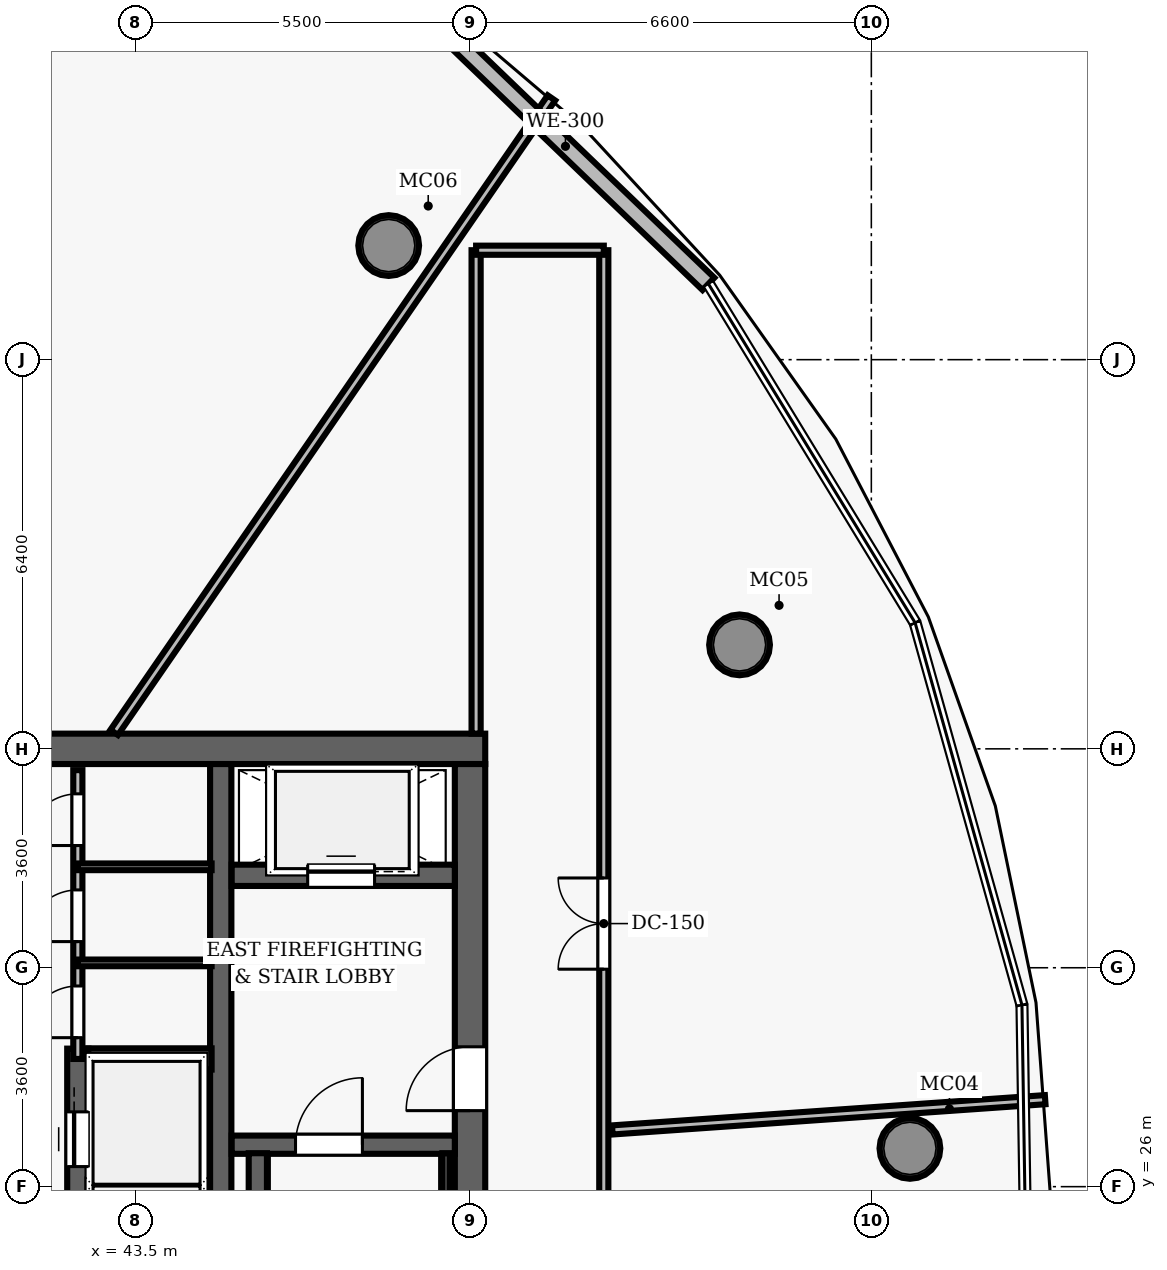
"""IFC4 building model, lengths in metres.
Left out: names, types, materials, properties, quantities, classifications, styles, units other than length and angle.
Written with IfcOpenShell. Run it as: python <this file> out.ifc"""

import sys

from ifc_helpers import new_model, si_unit, direction, frame, frame_2d, origin, origin_2d, place, context, subcontext, project, spatial, rectangle, hollow_circle, extrude, element, fill, save


model = new_model("IFC4")
c1 = context("Model", 3, precision=1e-05, world=origin(), true_north=direction((0.0, 1.0)))
c2 = subcontext(c1, "Body", "Model", "MODEL_VIEW")
j1 = project(units=[si_unit("LENGTHUNIT", "METRE"), si_unit("PLANEANGLEUNIT", "RADIAN")], contexts=[c1])
p1 = place(None, origin())
s1 = spatial("IfcSite", under=j1, at=p1, CompositionType="ELEMENT")
p2 = place(p1, origin())
s2 = spatial("IfcBuilding", under=s1, at=p2, CompositionType="ELEMENT")
p3 = place(p2, frame((0.0, 0.0, 299.8)))
s3 = spatial("IfcBuildingStorey", under=s2, at=p3, CompositionType="ELEMENT", Elevation=299.8)
p4 = place(p3, frame((26.75, 33.2, 0.0), z_axis=(0.0, 0.0, 1.0), x_axis=(1.0, 0.0, 0.0)))
e1 = element("IfcWall", 1, at=p4, inside=s3, PredefinedType="SHEAR", context=c2, shape_type="SweptSolid", body=[
    extrude(rectangle(XDim=22.5, YDim=0.5, at=frame_2d((11.25, 0.0))), origin(), (0.0, 0.0, 1.0), 3.85),
])
p5 = place(p3, frame((49.0, 19.05, 0.0), z_axis=(0.0, 0.0, 1.0), x_axis=(0.0, 1.0, 0.0)))
e2 = element("IfcWall", 2, at=p5, inside=s3, PredefinedType="SHEAR", context=c2, shape_type="SweptSolid", body=[
    extrude(rectangle(XDim=13.9, YDim=0.5, at=frame_2d((6.95, 0.0))), origin(), (0.0, 0.0, 1.0), 3.85),
])
p6 = place(p5, frame((8.2, 0.0, 0.0)))
e3 = element("IfcOpeningElement", 3, at=p6, cuts=e2, PredefinedType="OPENING", context=c2, shape_type="SweptSolid", body=[
    extrude(rectangle(XDim=1.05, YDim=2.15, at=frame_2d((0.525, 1.075))), frame((0.0, 0.26, 0.0), z_axis=(0.0, -1.0, 0.0), x_axis=(1.0, 0.0, 0.0)), (0.0, 0.0, 1.0), 0.52),
])
p7 = place(p3, frame((44.9, 19.05, 0.0), z_axis=(0.0, 0.0, 1.0), x_axis=(0.0, 1.0, 0.0)))
e4 = element("IfcWall", 4, at=p7, inside=s3, PredefinedType="SHEAR", context=c2, shape_type="SweptSolid", body=[
    extrude(rectangle(XDim=13.9, YDim=0.35, at=frame_2d((6.95, 0.0))), origin(), (0.0, 0.0, 1.0), 3.85),
])
for number, where, z_axis, x_axis in (
    (5, (56.235, 26.629, 0.0), (0.0, 0.0, 1.0), (1.0, 0.0, 0.0)),
    (6, (53.433, 34.91, 0.0), (0.0, 0.0, 1.0), (1.0, 0.0, 0.0)),
    (7, (47.662, 41.477, 0.0), (0.0, 0.0, 1.0), (1.0, 0.0, 0.0)),
):
    element("IfcColumn", number, at=place(p3, frame(where, z_axis=z_axis, x_axis=x_axis)), inside=s3, PredefinedType="COLUMN", context=c2, shape_type="SweptSolid", body=[
        extrude(hollow_circle(Radius=0.5, WallThickness=0.045, at=origin_2d()), origin(), (0.0, 0.0, 1.0), 3.85),
    ])
p8 = place(p3, frame((45.08, 26.69, 0.0), z_axis=(0.0, 0.0, 1.0), x_axis=(1.0, 0.0, 0.0)))
e8 = element("IfcWall", 8, at=p8, inside=s3, PredefinedType="SHEAR", context=c2, shape_type="SweptSolid", body=[
    extrude(rectangle(XDim=3.67, YDim=0.3, at=frame_2d((1.835, 0.0))), origin(), (0.0, 0.0, 1.0), 3.85),
])
p9 = place(p8, frame((1.05, 0.0, 0.0)))
e9 = element("IfcOpeningElement", 9, at=p9, cuts=e8, PredefinedType="OPENING", context=c2, shape_type="SweptSolid", body=[
    extrude(rectangle(XDim=1.1, YDim=2.15, at=frame_2d((0.55, 1.075))), frame((0.0, 0.16, 0.0), z_axis=(0.0, -1.0, 0.0), x_axis=(1.0, 0.0, 0.0)), (0.0, 0.0, 1.0), 0.32),
])
p10 = place(p3, frame((45.51, 19.05, 0.0), z_axis=(0.0, 0.0, 1.0), x_axis=(0.0, 1.0, 0.0)))
e10 = element("IfcWall", 10, at=p10, inside=s3, PredefinedType="SHEAR", context=c2, shape_type="SweptSolid", body=[
    extrude(rectangle(XDim=7.5, YDim=0.3, at=frame_2d((3.75, 0.0))), origin(), (0.0, 0.0, 1.0), 3.85),
])
p11 = place(p3, frame((48.605, 19.1, 0.0), z_axis=(0.0, 0.0, 1.0), x_axis=(0.0, 1.0, 0.0)))
e11 = element("IfcWall", 11, at=p11, inside=s3, PredefinedType="SHEAR", context=c2, shape_type="SweptSolid", body=[
    extrude(rectangle(XDim=7.45, YDim=0.12, at=frame_2d((3.725, 0.0))), origin(), (0.0, 0.0, 1.0), 3.85),
])
p12 = place(p3, frame((45.08, 31.12, 0.0), z_axis=(0.0, 0.0, 1.0), x_axis=(1.0, 0.0, 0.0)))
e12 = element("IfcWall", 12, at=p12, inside=s3, PredefinedType="SHEAR", context=c2, shape_type="SweptSolid", body=[
    extrude(rectangle(XDim=3.67, YDim=0.35, at=frame_2d((1.835, 0.0))), origin(), (0.0, 0.0, 1.0), 3.04),
])
p13 = place(p12, frame((1.25, 0.0, 0.0)))
e13 = element("IfcOpeningElement", 13, at=p13, cuts=e12, PredefinedType="OPENING", context=c2, shape_type="SweptSolid", body=[
    extrude(rectangle(XDim=1.1, YDim=2.15, at=frame_2d((0.55, 1.075))), frame((0.0, 0.185, 0.0), z_axis=(0.0, -1.0, 0.0), x_axis=(1.0, 0.0, 0.0)), (0.0, 0.0, 1.0), 0.37),
])
p14 = place(p3, frame((42.55, 21.73, 0.0), z_axis=(0.0, 0.0, 1.0), x_axis=(0.0, 1.0, 0.0)))
e14 = element("IfcWall", 14, at=p14, inside=s3, PredefinedType="SHEAR", context=c2, shape_type="SweptSolid", body=[
    extrude(rectangle(XDim=6.54, YDim=0.35, at=frame_2d((3.27, 0.0))), origin(), (0.0, 0.0, 1.0), 3.04),
])
p15 = place(p14, frame((0.5, 0.0, 0.0)))
e15 = element("IfcOpeningElement", 15, at=p15, cuts=e14, PredefinedType="OPENING", context=c2, shape_type="SweptSolid", body=[
    extrude(rectangle(XDim=0.9, YDim=2.15, at=frame_2d((0.45, 1.075))), frame((0.0, 0.185, 0.0), z_axis=(0.0, -1.0, 0.0), x_axis=(1.0, 0.0, 0.0)), (0.0, 0.0, 1.0), 0.37),
])
p16 = place(p14, frame((2.55, 0.0, 0.0)))
e16 = element("IfcOpeningElement", 16, at=p16, cuts=e14, PredefinedType="OPENING", context=c2, shape_type="SweptSolid", body=[
    extrude(rectangle(XDim=0.9, YDim=2.15, at=frame_2d((0.45, 1.075))), frame((0.0, 0.185, 0.0), z_axis=(0.0, -1.0, 0.0), x_axis=(1.0, 0.0, 0.0)), (0.0, 0.0, 1.0), 0.37),
])
p17 = place(p14, frame((4.6, 0.0, 0.0)))
e17 = element("IfcOpeningElement", 17, at=p17, cuts=e14, PredefinedType="OPENING", context=c2, shape_type="SweptSolid", body=[
    extrude(rectangle(XDim=0.9, YDim=2.15, at=frame_2d((0.45, 1.075))), frame((0.0, 0.185, 0.0), z_axis=(0.0, -1.0, 0.0), x_axis=(1.0, 0.0, 0.0)), (0.0, 0.0, 1.0), 0.37),
])
p18 = place(p3, frame((42.72, 28.1, 0.0), z_axis=(0.0, 0.0, 1.0), x_axis=(1.0, 0.0, 0.0)))
e18 = element("IfcWall", 18, at=p18, inside=s3, PredefinedType="SHEAR", context=c2, shape_type="SweptSolid", body=[
    extrude(rectangle(XDim=2.03, YDim=0.35, at=frame_2d((1.015, 0.0))), origin(), (0.0, 0.0, 1.0), 3.04),
])
p19 = place(p3, frame((42.55, 28.1, 0.0), z_axis=(0.0, 0.0, 1.0), x_axis=(0.0, 1.0, 0.0)))
e19 = element("IfcWall", 19, at=p19, inside=s3, PredefinedType="PARTITIONING", context=c2, shape_type="SweptSolid", body=[
    extrude(rectangle(XDim=4.75, YDim=0.15, at=frame_2d((2.375, 0.0))), origin(), (0.0, 0.0, 1.0), 3.04),
])
p20 = place(p19, frame((0.35, 0.0, 0.0)))
e20 = element("IfcOpeningElement", 20, at=p20, cuts=e19, PredefinedType="OPENING", context=c2, shape_type="SweptSolid", body=[
    extrude(rectangle(XDim=0.85, YDim=2.1, at=frame_2d((0.425, 1.05))), frame((0.0, 0.085, 0.0), z_axis=(0.0, -1.0, 0.0), x_axis=(1.0, 0.0, 0.0)), (0.0, 0.0, 1.0), 0.17),
])
p21 = place(p19, frame((1.93, 0.0, 0.0)))
e21 = element("IfcOpeningElement", 21, at=p21, cuts=e19, PredefinedType="OPENING", context=c2, shape_type="SweptSolid", body=[
    extrude(rectangle(XDim=0.85, YDim=2.1, at=frame_2d((0.425, 1.05))), frame((0.0, 0.085, 0.0), z_axis=(0.0, -1.0, 0.0), x_axis=(1.0, 0.0, 0.0)), (0.0, 0.0, 1.0), 0.17),
])
p22 = place(p19, frame((3.51, 0.0, 0.0)))
e22 = element("IfcOpeningElement", 22, at=p22, cuts=e19, PredefinedType="OPENING", context=c2, shape_type="SweptSolid", body=[
    extrude(rectangle(XDim=0.85, YDim=2.1, at=frame_2d((0.425, 1.05))), frame((0.0, 0.085, 0.0), z_axis=(0.0, -1.0, 0.0), x_axis=(1.0, 0.0, 0.0)), (0.0, 0.0, 1.0), 0.17),
])
for number, where, z_axis, x_axis in (
    (23, (42.55, 29.68, 0.0), (0.0, 0.0, 1.0), (1.0, 0.0, 0.0)),
    (24, (42.55, 31.26, 0.0), (0.0, 0.0, 1.0), (1.0, 0.0, 0.0)),
):
    element("IfcWall", number, at=place(p3, frame(where, z_axis=z_axis, x_axis=x_axis)), inside=s3, PredefinedType="PARTITIONING", context=c2, shape_type="SweptSolid", body=[
        extrude(rectangle(XDim=2.2, YDim=0.11, at=frame_2d((1.1, 0.0))), origin(), (0.0, 0.0, 1.0), 3.04),
    ])
p23 = place(p3, frame((51.2, 10.6, 0.0), z_axis=(0.0, 0.0, 1.0), x_axis=(0.0, 1.0, 0.0)))
e25 = element("IfcWall", 25, at=p23, inside=s3, PredefinedType="PARTITIONING", context=c2, shape_type="SweptSolid", body=[
    extrude(rectangle(XDim=30.8, YDim=0.15, at=frame_2d((15.4, 0.0))), origin(), (0.0, 0.0, 1.0), 3.04),
])
p24 = place(p23, frame((18.976, 0.0, 0.0)))
e26 = element("IfcOpeningElement", 26, at=p24, cuts=e25, PredefinedType="OPENING", context=c2, shape_type="SweptSolid", body=[
    extrude(rectangle(XDim=1.5, YDim=2.2, at=frame_2d((0.75, 1.1))), frame((0.0, 0.085, 0.0), z_axis=(0.0, -1.0, 0.0), x_axis=(1.0, 0.0, 0.0)), (0.0, 0.0, 1.0), 0.17),
])
p25 = place(p23, frame((12.135, 0.0, 0.0)))
e27 = element("IfcOpeningElement", 27, at=p25, cuts=e25, PredefinedType="OPENING", context=c2, shape_type="SweptSolid", body=[
    extrude(rectangle(XDim=0.95, YDim=2.15, at=frame_2d((0.475, 1.075))), frame((0.0, 0.085, 0.0), z_axis=(0.0, -1.0, 0.0), x_axis=(1.0, 0.0, 0.0)), (0.0, 0.0, 1.0), 0.17),
])
p26 = place(p3, frame((49.1, 33.45, 0.0), z_axis=(0.0, 0.0, 1.0), x_axis=(0.0, 1.0, 0.0)))
e28 = element("IfcWall", 28, at=p26, inside=s3, PredefinedType="PARTITIONING", context=c2, shape_type="SweptSolid", body=[
    extrude(rectangle(XDim=7.95, YDim=0.15, at=frame_2d((3.975, 0.0))), origin(), (0.0, 0.0, 1.0), 3.04),
])
p27 = place(p3, frame((49.1, 41.4, 0.0), z_axis=(0.0, 0.0, 1.0), x_axis=(1.0, 0.0, 0.0)))
e29 = element("IfcWall", 29, at=p27, inside=s3, PredefinedType="PARTITIONING", context=c2, shape_type="SweptSolid", body=[
    extrude(rectangle(XDim=2.1, YDim=0.15, at=frame_2d((1.05, 0.0))), origin(), (0.0, 0.0, 1.0), 3.04),
])
p28 = place(p3, frame((51.34, 26.933, 0.0), z_axis=(0.0, 0.0, 1.0), x_axis=(0.997564040522, 0.069756613005, 0.0)))
e30 = element("IfcWall", 30, at=p28, inside=s3, PredefinedType="PARTITIONING", context=c2, shape_type="SweptSolid", body=[
    extrude(rectangle(XDim=7.136, YDim=0.15, at=frame_2d((3.568, 0.0))), origin(), (0.0, 0.0, 1.0), 3.04),
])
p29 = place(p3, frame((43.148, 33.47, 0.0), z_axis=(0.0, 0.0, 1.0), x_axis=(0.56742949058, 0.82342198976, 0.0)))
e31 = element("IfcWall", 31, at=p29, inside=s3, PredefinedType="PARTITIONING", context=c2, shape_type="SweptSolid", body=[
    extrude(rectangle(XDim=12.673, YDim=0.15, at=frame_2d((6.336, 0.0))), origin(), (0.0, 0.0, 1.0), 3.04),
])
p30 = place(p3, frame((48.218, 45.371, 0.0), z_axis=(0.0, 0.0, 1.0), x_axis=(0.720629593397, -0.693320264467, 0.0)))
e32 = element("IfcWall", 32, at=p30, inside=s3, PredefinedType="SOLIDWALL", context=c2, shape_type="SweptSolid", body=[
    extrude(rectangle(XDim=6.526, YDim=0.28, at=frame_2d((3.263, 0.0))), origin(), (0.0, 0.0, 1.0), 3.625),
])
p31 = place(p9, origin())
e33 = element("IfcDoor", 33, at=p31, inside=s3, OperationType="SINGLE_SWING_RIGHT", PredefinedType="DOOR", context=c2, shape_type="SweptSolid", body=[
    extrude(rectangle(XDim=1.1, YDim=2.15, at=frame_2d((0.55, 1.075))), frame((0.0, 0.025, 0.0), z_axis=(0.0, -1.0, 0.0), x_axis=(1.0, 0.0, 0.0)), (0.0, 0.0, 1.0), 0.05),
])
fill(e9, e33)
p32 = place(p6, origin())
e34 = element("IfcDoor", 34, at=p32, inside=s3, OperationType="SINGLE_SWING_LEFT", PredefinedType="DOOR", context=c2, shape_type="SweptSolid", body=[
    extrude(rectangle(XDim=1.05, YDim=2.15, at=frame_2d((0.525, 1.075))), frame((0.0, 0.025, 0.0), z_axis=(0.0, -1.0, 0.0), x_axis=(1.0, 0.0, 0.0)), (0.0, 0.0, 1.0), 0.05),
])
fill(e3, e34)
p33 = place(p20, origin())
e35 = element("IfcDoor", 35, at=p33, inside=s3, OperationType="SINGLE_SWING_LEFT", PredefinedType="DOOR", context=c2, shape_type="SweptSolid", body=[
    extrude(rectangle(XDim=0.85, YDim=2.1, at=frame_2d((0.425, 1.05))), frame((0.0, 0.025, 0.0), z_axis=(0.0, -1.0, 0.0), x_axis=(1.0, 0.0, 0.0)), (0.0, 0.0, 1.0), 0.05),
])
fill(e20, e35)
p34 = place(p21, origin())
e36 = element("IfcDoor", 36, at=p34, inside=s3, OperationType="SINGLE_SWING_LEFT", PredefinedType="DOOR", context=c2, shape_type="SweptSolid", body=[
    extrude(rectangle(XDim=0.85, YDim=2.1, at=frame_2d((0.425, 1.05))), frame((0.0, 0.025, 0.0), z_axis=(0.0, -1.0, 0.0), x_axis=(1.0, 0.0, 0.0)), (0.0, 0.0, 1.0), 0.05),
])
fill(e21, e36)
p35 = place(p22, origin())
e37 = element("IfcDoor", 37, at=p35, inside=s3, OperationType="SINGLE_SWING_LEFT", PredefinedType="DOOR", context=c2, shape_type="SweptSolid", body=[
    extrude(rectangle(XDim=0.85, YDim=2.1, at=frame_2d((0.425, 1.05))), frame((0.0, 0.025, 0.0), z_axis=(0.0, -1.0, 0.0), x_axis=(1.0, 0.0, 0.0)), (0.0, 0.0, 1.0), 0.05),
])
fill(e22, e37)
p36 = place(p24, origin())
e38 = element("IfcDoor", 38, at=p36, inside=s3, OperationType="DOUBLE_DOOR_SINGLE_SWING", PredefinedType="DOOR", context=c2, shape_type="SweptSolid", body=[
    extrude(rectangle(XDim=1.5, YDim=2.2, at=frame_2d((0.75, 1.1))), frame((0.0, 0.025, 0.0), z_axis=(0.0, -1.0, 0.0), x_axis=(1.0, 0.0, 0.0)), (0.0, 0.0, 1.0), 0.05),
])
fill(e26, e38)
p37 = place(p17, origin())
e39 = element("IfcDoor", 39, at=p37, inside=s3, OperationType="SLIDING_TO_LEFT", PredefinedType="DOOR", context=c2, shape_type="SweptSolid", body=[
    extrude(rectangle(XDim=0.9, YDim=2.15, at=frame_2d((0.45, 1.075))), frame((0.0, 0.025, 0.0), z_axis=(0.0, -1.0, 0.0), x_axis=(1.0, 0.0, 0.0)), (0.0, 0.0, 1.0), 0.05),
])
fill(e17, e39)
p38 = place(p13, origin())
e40 = element("IfcDoor", 40, at=p38, inside=s3, OperationType="SLIDING_TO_LEFT", PredefinedType="DOOR", context=c2, shape_type="SweptSolid", body=[
    extrude(rectangle(XDim=1.1, YDim=2.15, at=frame_2d((0.55, 1.075))), frame((0.0, 0.025, 0.0), z_axis=(0.0, -1.0, 0.0), x_axis=(1.0, 0.0, 0.0)), (0.0, 0.0, 1.0), 0.05),
])
fill(e13, e40)
save(model, sys.argv[1])
